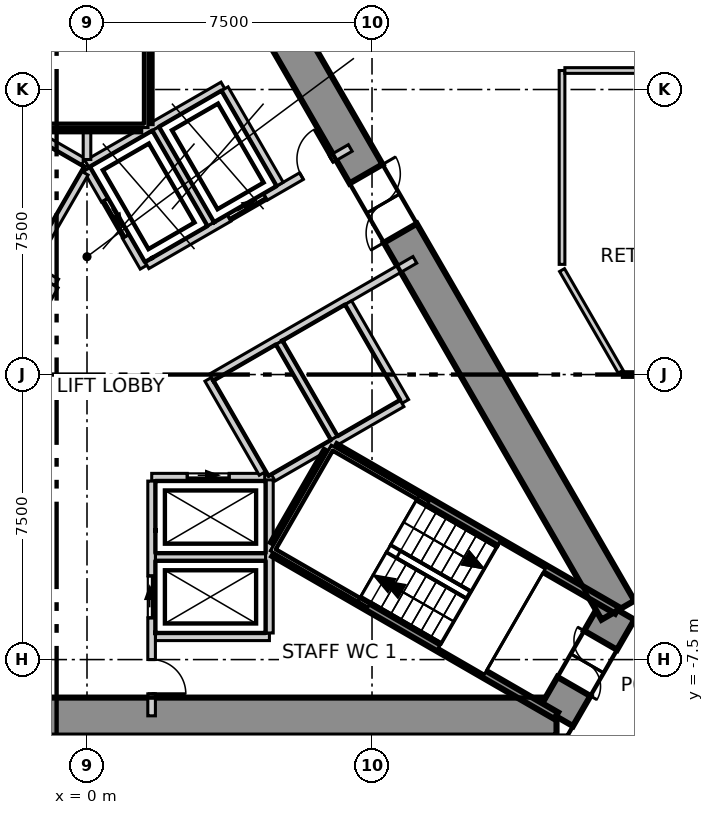
"""IFC4 building model, lengths in metres.
Left out: names, types, materials, properties, quantities, classifications, styles, units other than length and angle.
Written with IfcOpenShell. Run it as: python <this file> out.ifc"""

import sys

from ifc_helpers import new_model, si_unit, direction, frame, frame_2d, origin, place, context, subcontext, project, spatial, polyline, rectangle, outline, extrude, element, fill, save


model = new_model("IFC4")
c1 = context("Model", 3, precision=1e-05, world=origin(), true_north=direction((0.0, 1.0)))
c2 = subcontext(c1, "Body", "Model", "MODEL_VIEW")
j1 = project(units=[si_unit("LENGTHUNIT", "METRE"), si_unit("PLANEANGLEUNIT", "RADIAN")], contexts=[c1])
p1 = place(None, origin())
s1 = spatial("IfcSite", under=j1, at=p1, CompositionType="ELEMENT")
p2 = place(p1, origin())
s2 = spatial("IfcBuilding", under=s1, at=p2, CompositionType="ELEMENT")
p3 = place(p2, frame((0.0, 0.0, 19.9)))
s3 = spatial("IfcBuildingStorey", under=s2, at=p3, CompositionType="ELEMENT", Elevation=19.9)
p4 = place(p3, frame((-12.355, -9.0, -0.4), z_axis=(0.0, 0.0, 1.0), x_axis=(1.0, 0.0, 0.0)))
e1 = element("IfcWall", 1, at=p4, inside=s3, PredefinedType="SHEAR", context=c2, shape_type="SweptSolid", body=[
    extrude(outline(polyline([(-0.289, -0.5), (1.656, -0.5), (3.601, -0.5), (5.547, -0.5), (7.492, -0.5), (9.437, -0.5), (11.382, -0.5), (13.328, -0.5), (15.273, -0.5), (17.218, -0.5), (19.163, -0.5), (21.109, -0.5), (23.054, -0.5), (24.999, -0.5), (24.422, 0.5), (22.566, 0.5), (20.709, 0.5), (18.853, 0.5), (16.996, 0.5), (15.14, 0.5), (13.283, 0.5), (11.427, 0.5), (9.57, 0.5), (7.714, 0.5), (5.857, 0.5), (4.001, 0.5), (2.145, 0.5), (0.288, 0.5), (-0.289, -0.5)])), origin(), (0.0, 0.0, 1.0), 5.4),
])
p5 = place(p3, frame((12.355, -9.0, -0.4), z_axis=(0.0, 0.0, 1.0), x_axis=(0.500077567175, 0.865980615723, 0.0)))
e2 = element("IfcWall", 2, at=p5, inside=s3, PredefinedType="SHEAR", context=c2, shape_type="SweptSolid", body=[
    extrude(outline(polyline([(-0.288, -0.5), (1.617, -0.5), (3.522, -0.5), (2.945, 0.5), (1.617, 0.5), (0.289, 0.499), (-0.288, -0.5)])), origin(), (0.0, 0.0, 1.0), 5.4),
])
p6 = place(p5, frame((0.917, 0.0, 0.4)))
e3 = element("IfcOpeningElement", 3, at=p6, cuts=e2, PredefinedType="OPENING", context=c2, shape_type="SweptSolid", body=[
    extrude(rectangle(XDim=1.4, YDim=2.1, at=frame_2d((0.7, 1.05))), frame((0.0, 0.51, 0.0), z_axis=(0.0, -1.0, 0.0), x_axis=(1.0, 0.0, 0.0)), (0.0, 0.0, 1.0), 1.02),
])
p7 = place(p3, frame((13.972, -6.2, -0.4), z_axis=(0.0, 0.0, 1.0), x_axis=(-0.499992141631, 0.866029940768, 0.0)))
e4 = element("IfcWall", 4, at=p7, inside=s3, PredefinedType="SHEAR", context=c2, shape_type="SweptSolid", body=[
    extrude(outline(polyline([(-0.288, -0.5), (1.657, -0.5), (3.602, -0.5), (5.547, -0.5), (7.493, -0.5), (9.438, -0.5), (11.383, -0.5), (13.328, -0.5), (15.273, -0.5), (17.218, -0.499), (19.164, -0.499), (21.109, -0.499), (23.054, -0.499), (24.999, -0.499), (24.422, 0.5), (22.566, 0.5), (20.709, 0.5), (18.853, 0.5), (16.996, 0.5), (15.14, 0.5), (13.283, 0.5), (11.427, 0.5), (9.57, 0.5), (7.714, 0.5), (5.857, 0.5), (4.001, 0.5), (2.145, 0.5), (0.288, 0.5), (-0.288, -0.5)])), origin(), (0.0, 0.0, 1.0), 5.4),
])
p8 = place(p7, frame((11.455, 0.0, 0.4)))
e5 = element("IfcOpeningElement", 5, at=p8, cuts=e4, PredefinedType="OPENING", context=c2, shape_type="SweptSolid", body=[
    extrude(rectangle(XDim=1.8, YDim=2.1, at=frame_2d((0.9, 1.05))), frame((0.0, 0.51, 0.0), z_axis=(0.0, -1.0, 0.0), x_axis=(1.0, 0.0, 0.0)), (0.0, 0.0, 1.0), 1.02),
])
p9 = place(p3, frame((14.087, 0.0, 0.0), z_axis=(0.0, 0.0, 1.0), x_axis=(1.0, 0.0, 0.0)))
e6 = element("IfcWall", 6, at=p9, inside=s3, PredefinedType="PARTITIONING", context=c2, shape_type="SweptSolid", body=[
    extrude(rectangle(XDim=6.38, YDim=0.15, at=frame_2d((3.19, 0.0))), origin(), (0.0, 0.0, 1.0), 5.0),
])
p10 = place(p3, frame((12.5, 2.749, 0.0), z_axis=(0.0, 0.0, 1.0), x_axis=(0.500016752221, -0.866015731669, 0.0)))
e7 = element("IfcWall", 7, at=p10, inside=s3, PredefinedType="PARTITIONING", context=c2, shape_type="SweptSolid", body=[
    extrude(rectangle(XDim=3.088, YDim=0.15, at=frame_2d((1.544, 0.0))), origin(), (0.0, 0.0, 1.0), 5.0),
])
p11 = place(p3, frame((12.5, 2.899, 0.0), z_axis=(0.0, 0.0, 1.0), x_axis=(0.0, 1.0, 0.0)))
e8 = element("IfcWall", 8, at=p11, inside=s3, PredefinedType="PARTITIONING", context=c2, shape_type="SweptSolid", body=[
    extrude(rectangle(XDim=5.101, YDim=0.15, at=frame_2d((2.551, 0.0))), origin(), (0.0, 0.0, 1.0), 5.0),
])
p12 = place(p3, frame((12.575, 8.0, 0.0), z_axis=(0.0, 0.0, 1.0), x_axis=(1.0, 0.0, 0.0)))
e9 = element("IfcWall", 9, at=p12, inside=s3, PredefinedType="PARTITIONING", context=c2, shape_type="SweptSolid", body=[
    extrude(rectangle(XDim=3.273, YDim=0.15, at=frame_2d((1.636, 0.0))), origin(), (0.0, 0.0, 1.0), 5.0),
])
p13 = place(p3, frame((1.8, -4.8, 0.0), z_axis=(0.0, 0.0, 1.0), x_axis=(1.0, 0.0, 0.0)))
e10 = element("IfcWall", 10, at=p13, inside=s3, PredefinedType="SOLIDWALL", context=c2, shape_type="SweptSolid", body=[
    extrude(rectangle(XDim=2.9, YDim=0.2, at=frame_2d((1.45, 0.0))), origin(), (0.0, 0.0, 1.0), 5.0),
])
p14 = place(p3, frame((1.8, -6.9, 0.0), z_axis=(0.0, 0.0, 1.0), x_axis=(1.0, 0.0, 0.0)))
e11 = element("IfcWall", 11, at=p14, inside=s3, PredefinedType="SOLIDWALL", context=c2, shape_type="SweptSolid", body=[
    extrude(rectangle(XDim=3.0, YDim=0.2, at=frame_2d((1.5, 0.0))), origin(), (0.0, 0.0, 1.0), 5.0),
])
p15 = place(p3, frame((1.703, -2.7, 0.0), z_axis=(0.0, 0.0, 1.0), x_axis=(1.0, 0.0, 0.0)))
e12 = element("IfcWall", 12, at=p15, inside=s3, PredefinedType="SOLIDWALL", context=c2, shape_type="SweptSolid", body=[
    extrude(rectangle(XDim=2.973, YDim=0.2, at=frame_2d((1.487, 0.0))), origin(), (0.0, 0.0, 1.0), 5.0),
])
p16 = place(p15, frame((0.936, 0.0, 0.0)))
e13 = element("IfcOpeningElement", 13, at=p16, cuts=e12, PredefinedType="OPENING", context=c2, shape_type="SweptSolid", body=[
    extrude(rectangle(XDim=1.1, YDim=2.1, at=frame_2d((0.55, 1.05))), frame((0.0, 0.11, 0.0), z_axis=(0.0, -1.0, 0.0), x_axis=(1.0, 0.0, 0.0)), (0.0, 0.0, 1.0), 0.22),
])
p17 = place(p3, frame((-0.002, 5.542, 0.0), z_axis=(0.0, 0.0, 1.0), x_axis=(0.866103910842, 0.499863997127, 0.0)))
e14 = element("IfcWall", 14, at=p17, inside=s3, PredefinedType="SOLIDWALL", context=c2, shape_type="SweptSolid", body=[
    extrude(rectangle(XDim=4.131, YDim=0.2, at=frame_2d((2.065, 0.0))), origin(), (0.0, 0.0, 1.0), 5.0),
])
p18 = place(p3, frame((0.0, 5.4, 0.0), z_axis=(0.0, 0.0, 1.0), x_axis=(0.500103862429, -0.865965430478, 0.0)))
e15 = element("IfcWall", 15, at=p18, inside=s3, PredefinedType="SOLIDWALL", context=c2, shape_type="SweptSolid", body=[
    extrude(rectangle(XDim=2.973, YDim=0.2, at=frame_2d((1.487, 0.0))), origin(), (0.0, 0.0, 1.0), 5.0),
])
p19 = place(p18, frame((0.937, 0.0, 0.0)))
e16 = element("IfcOpeningElement", 16, at=p19, cuts=e15, PredefinedType="OPENING", context=c2, shape_type="SweptSolid", body=[
    extrude(rectangle(XDim=1.1, YDim=2.1, at=frame_2d((0.55, 1.05))), frame((0.0, 0.11, 0.0), z_axis=(0.0, -1.0, 0.0), x_axis=(1.0, 0.0, 0.0)), (0.0, 0.0, 1.0), 0.22),
])
p20 = place(p3, frame((3.19, -0.125, 0.0), z_axis=(0.0, 0.0, 1.0), x_axis=(0.499988658015, -0.866031951983, 0.0)))
e17 = element("IfcWall", 17, at=p20, inside=s3, PredefinedType="SOLIDWALL", context=c2, shape_type="SweptSolid", body=[
    extrude(rectangle(XDim=2.858, YDim=0.2, at=frame_2d((1.429, 0.0))), origin(), (0.0, 0.0, 1.0), 5.0),
])
p21 = place(p3, frame((1.578, 2.874, 0.0), z_axis=(0.0, 0.0, 1.0), x_axis=(0.866055259465, 0.499948284879, 0.0)))
e18 = element("IfcWall", 18, at=p21, inside=s3, PredefinedType="SOLIDWALL", context=c2, shape_type="SweptSolid", body=[
    extrude(rectangle(XDim=6.177, YDim=0.2, at=frame_2d((3.088, 0.0))), origin(), (0.0, 0.0, 1.0), 5.0),
])
p22 = place(p21, frame((2.496, 0.0, 0.0)))
e19 = element("IfcOpeningElement", 19, at=p22, cuts=e18, PredefinedType="OPENING", context=c2, shape_type="SweptSolid", body=[
    extrude(rectangle(XDim=1.1, YDim=2.1, at=frame_2d((0.55, 1.05))), frame((0.0, 0.11, 0.0), z_axis=(0.0, -1.0, 0.0), x_axis=(1.0, 0.0, 0.0)), (0.0, 0.0, 1.0), 0.22),
])
p23 = place(p21, frame((4.696, 0.0, 0.0)))
e20 = element("IfcOpeningElement", 20, at=p23, cuts=e18, PredefinedType="OPENING", context=c2, shape_type="SweptSolid", body=[
    extrude(rectangle(XDim=0.9, YDim=2.1, at=frame_2d((0.45, 1.05))), frame((0.0, 0.11, 0.0), z_axis=(0.0, -1.0, 0.0), x_axis=(1.0, 0.0, 0.0)), (0.0, 0.0, 1.0), 0.22),
])
p24 = place(p3, frame((1.7, -8.98, 0.0), z_axis=(0.0, 0.0, 1.0), x_axis=(0.0, 1.0, 0.0)))
e21 = element("IfcWall", 21, at=p24, inside=s3, PredefinedType="SOLIDWALL", context=c2, shape_type="SweptSolid", body=[
    extrude(rectangle(XDim=6.177, YDim=0.2, at=frame_2d((3.088, 0.0))), origin(), (0.0, 0.0, 1.0), 5.0),
])
p25 = place(p24, frame((2.58, 0.0, 0.0)))
e22 = element("IfcOpeningElement", 22, at=p25, cuts=e21, PredefinedType="OPENING", context=c2, shape_type="SweptSolid", body=[
    extrude(rectangle(XDim=1.1, YDim=2.1, at=frame_2d((0.55, 1.05))), frame((0.0, 0.11, 0.0), z_axis=(0.0, -1.0, 0.0), x_axis=(1.0, 0.0, 0.0)), (0.0, 0.0, 1.0), 0.22),
])
p26 = place(p24, frame((0.58, 0.0, 0.0)))
e23 = element("IfcOpeningElement", 23, at=p26, cuts=e21, PredefinedType="OPENING", context=c2, shape_type="SweptSolid", body=[
    extrude(rectangle(XDim=0.9, YDim=2.1, at=frame_2d((0.45, 1.05))), frame((0.0, 0.11, 0.0), z_axis=(0.0, -1.0, 0.0), x_axis=(1.0, 0.0, 0.0)), (0.0, 0.0, 1.0), 0.22),
])
p27 = place(p3, frame((4.8, -6.8, 0.0), z_axis=(0.0, 0.0, 1.0), x_axis=(0.0, 1.0, 0.0)))
e24 = element("IfcWall", 24, at=p27, inside=s3, PredefinedType="SOLIDWALL", context=c2, shape_type="SweptSolid", body=[
    extrude(rectangle(XDim=4.029, YDim=0.2, at=frame_2d((2.015, 0.0))), origin(), (0.0, 0.0, 1.0), 5.0),
])
p28 = place(p3, frame((3.278, -0.071, 0.0), z_axis=(0.0, 0.0, 1.0), x_axis=(0.865959795517, 0.500113619639, 0.0)))
e25 = element("IfcWall", 25, at=p28, inside=s3, PredefinedType="SOLIDWALL", context=c2, shape_type="SweptSolid", body=[
    extrude(rectangle(XDim=6.177, YDim=0.2, at=frame_2d((3.088, 0.0))), origin(), (0.0, 0.0, 1.0), 5.0),
])
p29 = place(p3, frame((3.626, 7.52, 0.0), z_axis=(0.0, 0.0, 1.0), x_axis=(0.500060147554, -0.865990674793, 0.0)))
e26 = element("IfcWall", 26, at=p29, inside=s3, PredefinedType="SOLIDWALL", context=c2, shape_type="SweptSolid", body=[
    extrude(rectangle(XDim=2.9, YDim=0.2, at=frame_2d((1.45, 0.0))), origin(), (0.0, 0.0, 1.0), 5.0),
])
p30 = place(p3, frame((6.876, 1.891, 0.0), z_axis=(0.0, 0.0, 1.0), x_axis=(0.499990139034, -0.866031096941, 0.0)))
e27 = element("IfcWall", 27, at=p30, inside=s3, PredefinedType="SOLIDWALL", context=c2, shape_type="SweptSolid", body=[
    extrude(rectangle(XDim=3.0, YDim=0.2, at=frame_2d((1.5, 0.0))), origin(), (0.0, 0.0, 1.0), 5.0),
])
for number, where, z_axis, x_axis in (
    (28, (1.807, 6.47, 0.0), (0.0, 0.0, 1.0), (0.5, -0.866, 0.0)),
    (29, (5.057, 0.841, 0.0), (0.0, 0.0, 1.0), (0.5, -0.866, 0.0)),
):
    element("IfcWall", number, at=place(p3, frame(where, z_axis=z_axis, x_axis=x_axis)), inside=s3, PredefinedType="SOLIDWALL", context=c2, shape_type="SweptSolid", body=[
        extrude(rectangle(XDim=2.9, YDim=0.2, at=frame_2d((1.45, 0.0))), origin(), (0.0, 0.0, 1.0), 5.0),
    ])
p31 = place(p3, frame((4.9, -2.714, 0.0), z_axis=(0.0, 0.0, 1.0), x_axis=(0.865992350556, 0.500057245502, 0.0)))
e30 = element("IfcWall", 30, at=p31, inside=s3, PredefinedType="SOLIDWALL", context=c2, shape_type="SweptSolid", body=[
    extrude(rectangle(XDim=3.914, YDim=0.2, at=frame_2d((1.957, 0.0))), origin(), (0.0, 0.0, 1.0), 5.0),
])
p32 = place(p3, frame((-1.488, 2.822, 0.0), z_axis=(0.0, 0.0, 1.0), x_axis=(0.866236612152, -0.499633997809, 0.0)))
e31 = element("IfcWall", 31, at=p32, inside=s3, PredefinedType="SOLIDWALL", context=c2, shape_type="SweptSolid", body=[
    extrude(rectangle(XDim=0.796, YDim=0.2, at=frame_2d((0.398, 0.0))), origin(), (0.0, 0.0, 1.0), 5.0),
])
p33 = place(p3, frame((-2.444, -0.433, 0.0), z_axis=(0.0, 0.0, 1.0), x_axis=(0.500035624827, 0.866004834804, 0.0)))
e32 = element("IfcWall", 32, at=p33, inside=s3, PredefinedType="SOLIDWALL", context=c2, shape_type="SweptSolid", body=[
    extrude(rectangle(XDim=3.194, YDim=0.2, at=frame_2d((1.597, 0.0))), origin(), (0.0, 0.0, 1.0), 5.0),
])
p34 = place(p3, frame((-1.67, 6.507, 0.0), z_axis=(0.0, 0.0, 1.0), x_axis=(0.865941441609, -0.500145398563, 0.0)))
e33 = element("IfcWall", 33, at=p34, inside=s3, PredefinedType="SOLIDWALL", context=c2, shape_type="SweptSolid", body=[
    extrude(rectangle(XDim=1.815, YDim=0.2, at=frame_2d((0.908, 0.0))), origin(), (0.0, 0.0, 1.0), 5.0),
])
p35 = place(p3, frame((-1.438, 2.909, 0.0), z_axis=(0.0, 0.0, 1.0), x_axis=(0.499829630636, 0.866123744241, 0.0)))
e34 = element("IfcWall", 34, at=p35, inside=s3, PredefinedType="SOLIDWALL", context=c2, shape_type="SweptSolid", body=[
    extrude(rectangle(XDim=2.761, YDim=0.2, at=frame_2d((1.38, 0.0))), origin(), (0.0, 0.0, 1.0), 5.0),
])
p36 = place(p3, frame((0.0, 5.658, 0.0), z_axis=(0.0, 0.0, 1.0), x_axis=(0.0, 1.0, 0.0)))
e35 = element("IfcWall", 35, at=p36, inside=s3, PredefinedType="SOLIDWALL", context=c2, shape_type="SweptSolid", body=[
    extrude(rectangle(XDim=0.742, YDim=0.2, at=frame_2d((0.371, 0.0))), origin(), (0.0, 0.0, 1.0), 5.0),
])
p37 = place(p3, frame((1.6, 6.615, 0.0), z_axis=(0.0, 0.0, 1.0), x_axis=(0.0, 1.0, 0.0)))
e36 = element("IfcWall", 36, at=p37, inside=s3, PredefinedType="SOLIDWALL", context=c2, shape_type="SweptSolid", body=[
    extrude(rectangle(XDim=8.565, YDim=0.2, at=frame_2d((4.282, 0.0))), origin(), (0.0, 0.0, 1.0), 5.0),
])
p38 = place(p3, frame((-1.4, 6.5, 0.0), z_axis=(0.0, 0.0, 1.0), x_axis=(1.0, 0.0, 0.0)))
e37 = element("IfcWall", 37, at=p38, inside=s3, PredefinedType="SOLIDWALL", context=c2, shape_type="SweptSolid", body=[
    extrude(rectangle(XDim=2.8, YDim=0.2, at=frame_2d((1.4, 0.0))), origin(), (0.0, 0.0, 1.0), 5.0),
])
p39 = place(p3, frame((4.929, -4.693, 0.0), z_axis=(0.0, 0.0, 1.0), x_axis=(0.865987152174, -0.50006624788, 0.0)))
e38 = element("IfcWall", 38, at=p39, inside=s3, PredefinedType="SOLIDWALL", context=c2, shape_type="SweptSolid", body=[
    extrude(rectangle(XDim=8.565, YDim=0.2, at=frame_2d((4.282, 0.0))), origin(), (0.0, 0.0, 1.0), 5.0),
])
p40 = place(p3, frame((4.929, -4.462, 0.0), z_axis=(0.0, 0.0, 1.0), x_axis=(0.500200581029, 0.865909567298, 0.0)))
e39 = element("IfcWall", 39, at=p40, inside=s3, PredefinedType="SOLIDWALL", context=c2, shape_type="SweptSolid", body=[
    extrude(rectangle(XDim=2.799, YDim=0.2, at=frame_2d((1.399, 0.0))), origin(), (0.0, 0.0, 1.0), 5.0),
])
p41 = place(p3, frame((6.529, -1.922, 0.0), z_axis=(0.0, 0.0, 1.0), x_axis=(0.866036527536, -0.499980732602, 0.0)))
e40 = element("IfcWall", 40, at=p41, inside=s3, PredefinedType="SOLIDWALL", context=c2, shape_type="SweptSolid", body=[
    extrude(rectangle(XDim=8.564, YDim=0.2, at=frame_2d((4.282, 0.0))), origin(), (0.0, 0.0, 1.0), 5.0),
])
p42 = place(p16, origin())
e41 = element("IfcDoor", 41, at=p42, inside=s3, OperationType="SLIDING_TO_LEFT", PredefinedType="DOOR", context=c2, shape_type="SweptSolid", body=[
    extrude(rectangle(XDim=1.1, YDim=2.1, at=frame_2d((0.55, 1.05))), frame((0.0, 0.025, 0.0), z_axis=(0.0, -1.0, 0.0), x_axis=(1.0, 0.0, 0.0)), (0.0, 0.0, 1.0), 0.05),
])
fill(e13, e41)
p43 = place(p25, origin())
e42 = element("IfcDoor", 42, at=p43, inside=s3, OperationType="SLIDING_TO_LEFT", PredefinedType="DOOR", context=c2, shape_type="SweptSolid", body=[
    extrude(rectangle(XDim=1.1, YDim=2.1, at=frame_2d((0.55, 1.05))), frame((0.0, 0.025, 0.0), z_axis=(0.0, -1.0, 0.0), x_axis=(1.0, 0.0, 0.0)), (0.0, 0.0, 1.0), 0.05),
])
fill(e22, e42)
p44 = place(p19, origin())
e43 = element("IfcDoor", 43, at=p44, inside=s3, OperationType="SLIDING_TO_LEFT", PredefinedType="DOOR", context=c2, shape_type="SweptSolid", body=[
    extrude(rectangle(XDim=1.1, YDim=2.1, at=frame_2d((0.55, 1.05))), frame((0.0, 0.025, 0.0), z_axis=(0.0, -1.0, 0.0), x_axis=(1.0, 0.0, 0.0)), (0.0, 0.0, 1.0), 0.05),
])
fill(e16, e43)
p45 = place(p22, origin())
e44 = element("IfcDoor", 44, at=p45, inside=s3, OperationType="SLIDING_TO_LEFT", PredefinedType="DOOR", context=c2, shape_type="SweptSolid", body=[
    extrude(rectangle(XDim=1.1, YDim=2.1, at=frame_2d((0.55, 1.05))), frame((0.0, 0.025, 0.0), z_axis=(0.0, -1.0, 0.0), x_axis=(1.0, 0.0, 0.0)), (0.0, 0.0, 1.0), 0.05),
])
fill(e19, e44)
p46 = place(p8, origin())
e45 = element("IfcDoor", 45, at=p46, inside=s3, OperationType="DOUBLE_DOOR_SINGLE_SWING", PredefinedType="DOOR", context=c2, shape_type="SweptSolid", body=[
    extrude(rectangle(XDim=1.8, YDim=2.1, at=frame_2d((0.9, 1.05))), frame((0.0, 0.025, 0.0), z_axis=(0.0, -1.0, 0.0), x_axis=(1.0, 0.0, 0.0)), (0.0, 0.0, 1.0), 0.05),
])
fill(e5, e45)
p47 = place(p6, origin())
e46 = element("IfcDoor", 46, at=p47, inside=s3, OperationType="DOUBLE_DOOR_SINGLE_SWING", PredefinedType="DOOR", context=c2, shape_type="SweptSolid", body=[
    extrude(rectangle(XDim=1.4, YDim=2.1, at=frame_2d((0.7, 1.05))), frame((0.0, 0.025, 0.0), z_axis=(0.0, -1.0, 0.0), x_axis=(1.0, 0.0, 0.0)), (0.0, 0.0, 1.0), 0.05),
])
fill(e3, e46)
p48 = place(p23, origin())
e47 = element("IfcDoor", 47, at=p48, inside=s3, OperationType="SINGLE_SWING_LEFT", PredefinedType="DOOR", context=c2, shape_type="SweptSolid", body=[
    extrude(rectangle(XDim=0.9, YDim=2.1, at=frame_2d((0.45, 1.05))), frame((0.0, 0.025, 0.0), z_axis=(0.0, -1.0, 0.0), x_axis=(1.0, 0.0, 0.0)), (0.0, 0.0, 1.0), 0.05),
])
fill(e20, e47)
p49 = place(p26, origin())
e48 = element("IfcDoor", 48, at=p49, inside=s3, OperationType="SINGLE_SWING_LEFT", PredefinedType="DOOR", context=c2, shape_type="SweptSolid", body=[
    extrude(rectangle(XDim=0.9, YDim=2.1, at=frame_2d((0.45, 1.05))), frame((0.0, 0.025, 0.0), z_axis=(0.0, -1.0, 0.0), x_axis=(1.0, 0.0, 0.0)), (0.0, 0.0, 1.0), 0.05),
])
fill(e23, e48)
save(model, sys.argv[1])
